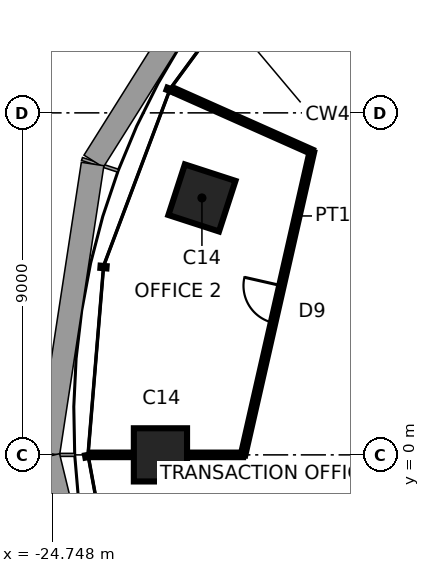
"""IFC4 building model, lengths in metres.
Left out: names, types, materials, properties, quantities, classifications, styles, units other than length and angle.
Written with IfcOpenShell. Run it as: python <this file> out.ifc"""

import sys

from ifc_helpers import new_model, si_unit, direction, frame, frame_2d, origin, origin_2d, place, context, subcontext, project, spatial, rectangle, extrude, element, fill, save


model = new_model("IFC4")
c1 = context("Model", 3, precision=1e-05, world=origin(), true_north=direction((0.0, 1.0)))
c2 = subcontext(c1, "Body", "Model", "MODEL_VIEW")
j1 = project(units=[si_unit("LENGTHUNIT", "METRE"), si_unit("PLANEANGLEUNIT", "RADIAN")], contexts=[c1])
p1 = place(None, origin())
s1 = spatial("IfcSite", under=j1, at=p1, CompositionType="ELEMENT")
p2 = place(p1, origin())
s2 = spatial("IfcBuilding", under=s1, at=p2, CompositionType="ELEMENT")
p3 = place(p2, frame((0.0, 0.0, 234.5)))
s3 = spatial("IfcBuildingStorey", under=s2, at=p3, CompositionType="ELEMENT", Elevation=234.5)
for number, where, z_axis, x_axis in (
    (1, (-20.808, 6.761, 0.0), (0.0, 0.0, 1.0), (-0.951, 0.309, 0.0)),
    (2, (-21.9, 0.0, 0.0), (0.0, 0.0, 1.0), (-1.0, 0.0, 0.0)),
):
    element("IfcColumn", number, at=place(p3, frame(where, z_axis=z_axis, x_axis=x_axis)), inside=s3, PredefinedType="COLUMN", context=c2, shape_type="SweptSolid", body=[
        extrude(rectangle(XDim=1.4, YDim=1.4, at=origin_2d()), origin(), (0.0, 0.0, 1.0), 3.9),
    ])
p4 = place(p3, frame((-17.915, 7.976, 0.0), z_axis=(0.0, 0.0, 1.0), x_axis=(-0.913549606868, 0.406727323635, 0.0)))
e3 = element("IfcWall", 3, at=p4, inside=s3, PredefinedType="PARTITIONING", context=c2, shape_type="SweptSolid", body=[
    extrude(rectangle(XDim=4.0, YDim=0.12, at=frame_2d((2.0, 0.0))), origin(), (0.0, 0.0, 1.0), 3.74),
])
p5 = place(p3, frame((-19.726, 0.0, 0.0), z_axis=(0.0, 0.0, 1.0), x_axis=(0.221444355936, 0.975173008868, 0.0)))
e4 = element("IfcWall", 4, at=p5, inside=s3, PredefinedType="PARTITIONING", context=c2, shape_type="SweptSolid", body=[
    extrude(rectangle(XDim=8.179, YDim=0.12, at=frame_2d((4.09, 0.0))), origin(), (0.0, 0.0, 1.0), 3.334),
])
p6 = place(p5, frame((3.565, 0.0, 0.0)))
e5 = element("IfcOpeningElement", 5, at=p6, cuts=e4, PredefinedType="OPENING", context=c2, shape_type="SweptSolid", body=[
    extrude(rectangle(XDim=1.0, YDim=2.4, at=frame_2d((0.5, 1.2))), frame((0.0, 0.07, 0.0), z_axis=(0.0, -1.0, 0.0), x_axis=(1.0, 0.0, 0.0)), (0.0, 0.0, 1.0), 0.14),
])
p7 = place(p3, frame((-23.726, 0.0, 0.0), z_axis=(0.0, 0.0, 1.0), x_axis=(1.0, 0.0, 0.0)))
e6 = element("IfcWall", 6, at=p7, inside=s3, PredefinedType="PARTITIONING", context=c2, shape_type="SweptSolid", body=[
    extrude(rectangle(XDim=4.0, YDim=0.12, at=frame_2d((2.0, 0.0))), origin(), (0.0, 0.0, 1.0), 3.04),
])
p8 = place(p6, origin())
e7 = element("IfcDoor", 7, at=p8, inside=s3, OperationType="SINGLE_SWING_RIGHT", PredefinedType="DOOR", context=c2, shape_type="SweptSolid", body=[
    extrude(rectangle(XDim=1.0, YDim=2.4, at=frame_2d((0.5, 1.2))), frame((0.0, 0.025, 0.0), z_axis=(0.0, -1.0, 0.0), x_axis=(1.0, 0.0, 0.0)), (0.0, 0.0, 1.0), 0.05),
])
fill(e5, e7)
save(model, sys.argv[1])
